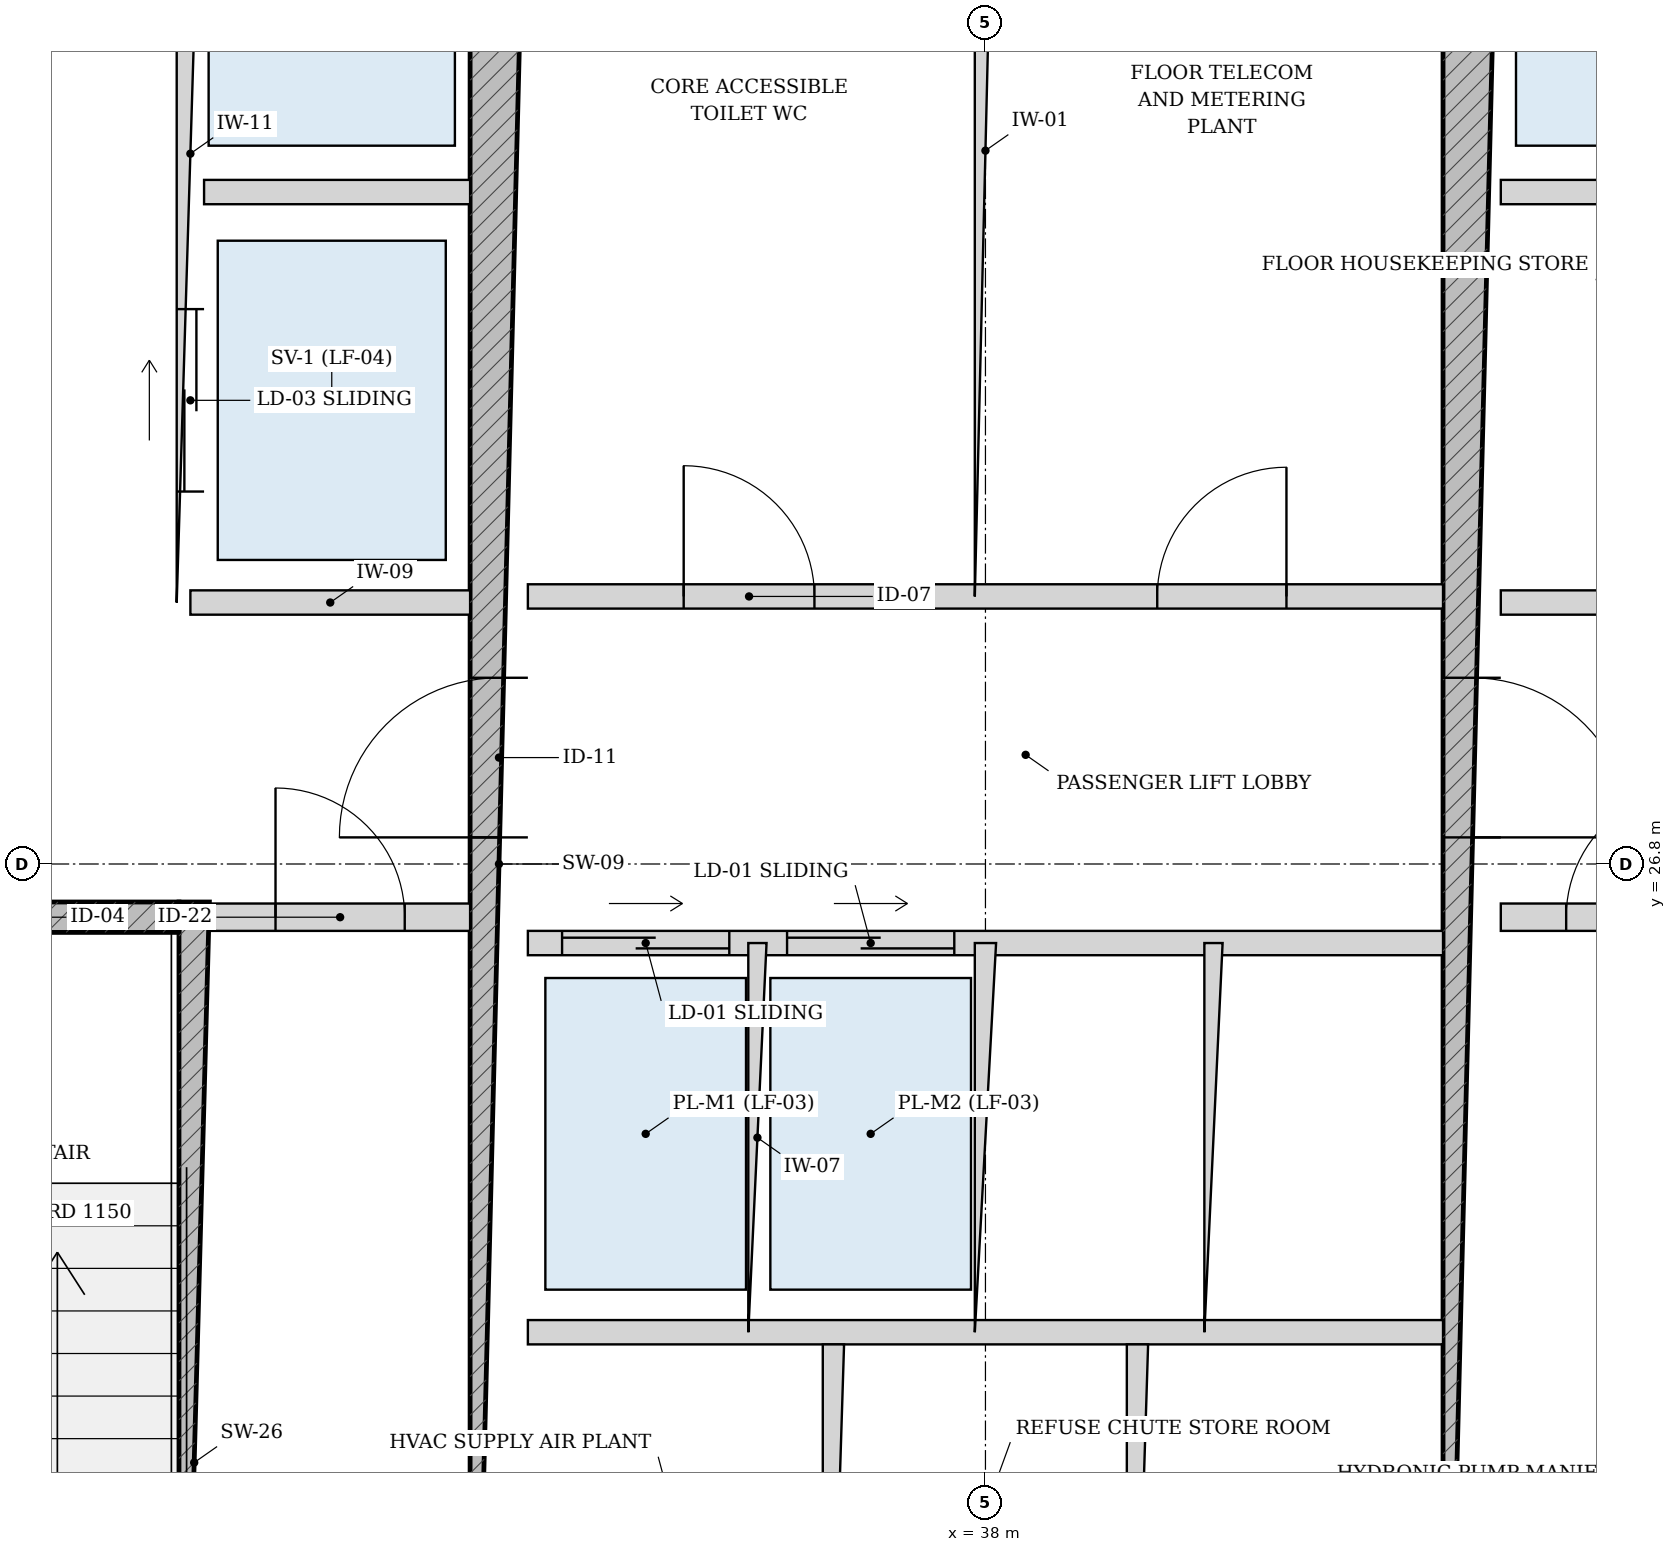
"""IFC4 building model, lengths in metres.
Left out: names, types, materials, properties, quantities, classifications, styles, units other than length and angle.
Written with IfcOpenShell. Run it as: python <this file> out.ifc"""

import sys

from ifc_helpers import new_model, si_unit, direction, frame, frame_2d, origin, place, context, subcontext, project, spatial, rectangle, extrude, source, transform, mapped, element, fill, save


model = new_model("IFC4")
c1 = context("Model", 3, precision=1e-05, world=origin(), true_north=direction((-0.2419218956, 0.970295726276)))
c2 = subcontext(c1, "Body", "Model", "MODEL_VIEW")
j1 = project(units=[si_unit("LENGTHUNIT", "METRE"), si_unit("PLANEANGLEUNIT", "RADIAN")], contexts=[c1])
p1 = place(None, origin())
s1 = spatial("IfcSite", under=j1, at=p1, CompositionType="ELEMENT")
p2 = place(p1, origin())
s2 = spatial("IfcBuilding", under=s1, at=p2, CompositionType="ELEMENT")
p3 = place(p2, frame((0.0, 0.0, 167.8)))
s3 = spatial("IfcBuildingStorey", under=s2, at=p3, CompositionType="ELEMENT", Elevation=167.8)
p4 = place(p3, frame((32.795, 19.175, 0.0), z_axis=(0.0, 0.0, 1.0), x_axis=(0.0, 1.0, 0.0)))
e1 = element("IfcWall", 1, at=p4, inside=s3, PredefinedType="SOLIDWALL", context=c2, shape_type="SweptSolid", body=[
    extrude(rectangle(XDim=7.375, YDim=0.2, at=frame_2d((3.688, 0.0))), origin(), (0.0, 0.0, 1.0), 3.33),
])
p5 = place(p3, frame((29.375, 26.45, 0.0), z_axis=(0.0, 0.0, 1.0), x_axis=(1.0, 0.0, 0.0)))
e2 = element("IfcWall", 2, at=p5, inside=s3, PredefinedType="SOLIDWALL", context=c2, shape_type="SweptSolid", body=[
    extrude(rectangle(XDim=3.32, YDim=0.2, at=frame_2d((1.66, 0.0))), origin(), (0.0, 0.0, 1.0), 3.33),
])
p6 = place(p5, frame((1.185, 0.0, 0.0)))
e3 = element("IfcOpeningElement", 3, at=p6, cuts=e2, PredefinedType="OPENING", context=c2, shape_type="SweptSolid", body=[
    extrude(rectangle(XDim=0.95, YDim=2.15, at=frame_2d((0.475, 1.075))), frame((0.0, 0.11, 0.0), z_axis=(0.0, -1.0, 0.0), x_axis=(1.0, 0.0, 0.0)), (0.0, 0.0, 1.0), 0.22),
])
p7 = place(p3, frame((34.8, 19.175, 0.0), z_axis=(0.0, 0.0, 1.0), x_axis=(0.0, 1.0, 0.0)))
e4 = element("IfcWall", 4, at=p7, inside=s3, PredefinedType="SHEAR", context=c2, shape_type="SweptSolid", body=[
    extrude(rectangle(XDim=15.25, YDim=0.38, at=frame_2d((7.625, 0.0))), origin(), (0.0, 0.0, 1.0), 3.33),
])
p8 = place(p7, frame((7.8, 0.0, 0.0)))
e5 = element("IfcOpeningElement", 5, at=p8, cuts=e4, PredefinedType="OPENING", context=c2, shape_type="SweptSolid", body=[
    extrude(rectangle(XDim=1.05, YDim=2.15, at=frame_2d((0.525, 1.075))), frame((0.0, 0.2, 0.0), z_axis=(0.0, -1.0, 0.0), x_axis=(1.0, 0.0, 0.0)), (0.0, 0.0, 1.0), 0.4),
])
p9 = place(p3, frame((41.2, 19.175, 0.0), z_axis=(0.0, 0.0, 1.0), x_axis=(0.0, 1.0, 0.0)))
e6 = element("IfcWall", 6, at=p9, inside=s3, PredefinedType="SHEAR", context=c2, shape_type="SweptSolid", body=[
    extrude(rectangle(XDim=15.25, YDim=0.38, at=frame_2d((7.625, 0.0))), origin(), (0.0, 0.0, 1.0), 3.33),
])
p10 = place(p9, frame((7.8, 0.0, 0.0)))
e7 = element("IfcOpeningElement", 7, at=p10, cuts=e6, PredefinedType="OPENING", context=c2, shape_type="SweptSolid", body=[
    extrude(rectangle(XDim=1.05, YDim=2.15, at=frame_2d((0.525, 1.075))), frame((0.0, 0.2, 0.0), z_axis=(0.0, -1.0, 0.0), x_axis=(1.0, 0.0, 0.0)), (0.0, 0.0, 1.0), 0.4),
])
p11 = place(p3, frame((32.9, 26.45, 0.0), z_axis=(0.0, 0.0, 1.0), x_axis=(1.0, 0.0, 0.0)))
e8 = element("IfcWall", 8, at=p11, inside=s3, PredefinedType="PARTITIONING", context=c2, shape_type="SweptSolid", body=[
    extrude(rectangle(XDim=1.71, YDim=0.18, at=frame_2d((0.855, 0.0))), origin(), (0.0, 0.0, 1.0), 3.33),
])
p12 = place(p11, frame((0.43, 0.0, 0.0)))
e9 = element("IfcOpeningElement", 9, at=p12, cuts=e8, PredefinedType="OPENING", context=c2, shape_type="SweptSolid", body=[
    extrude(rectangle(XDim=0.85, YDim=2.1, at=frame_2d((0.425, 1.05))), frame((0.0, 0.1, 0.0), z_axis=(0.0, -1.0, 0.0), x_axis=(1.0, 0.0, 0.0)), (0.0, 0.0, 1.0), 0.2),
])
p13 = place(p3, frame((41.39, 26.45, 0.0), z_axis=(0.0, 0.0, 1.0), x_axis=(1.0, 0.0, 0.0)))
e10 = element("IfcWall", 10, at=p13, inside=s3, PredefinedType="PARTITIONING", context=c2, shape_type="SweptSolid", body=[
    extrude(rectangle(XDim=1.71, YDim=0.18, at=frame_2d((0.855, 0.0))), origin(), (0.0, 0.0, 1.0), 3.33),
])
p14 = place(p13, frame((0.43, 0.0, 0.0)))
e11 = element("IfcOpeningElement", 11, at=p14, cuts=e10, PredefinedType="OPENING", context=c2, shape_type="SweptSolid", body=[
    extrude(rectangle(XDim=0.85, YDim=2.1, at=frame_2d((0.425, 1.05))), frame((0.0, 0.1, 0.0), z_axis=(0.0, -1.0, 0.0), x_axis=(1.0, 0.0, 0.0)), (0.0, 0.0, 1.0), 0.2),
])
p15 = place(p3, frame((32.77, 28.52, 0.0), z_axis=(0.0, 0.0, 1.0), x_axis=(0.0, 1.0, 0.0)))
e12 = element("IfcWall", 12, at=p15, inside=s3, PredefinedType="PARTITIONING", context=c2, shape_type="SweptSolid", body=[
    extrude(rectangle(XDim=5.905, YDim=0.18, at=frame_2d((2.953, 0.0))), origin(), (0.0, 0.0, 1.0), 3.33),
])
p16 = place(p15, frame((3.655, 0.0, 0.0)))
e13 = element("IfcOpeningElement", 13, at=p16, cuts=e12, PredefinedType="OPENING", context=c2, shape_type="SweptSolid", body=[
    extrude(rectangle(XDim=1.15, YDim=2.2, at=frame_2d((0.575, 1.1))), frame((0.0, 0.1, 0.0), z_axis=(0.0, -1.0, 0.0), x_axis=(1.0, 0.0, 0.0)), (0.0, 0.0, 1.0), 0.2),
])
p17 = place(p15, frame((0.73, 0.0, 0.0)))
e14 = element("IfcOpeningElement", 14, at=p17, cuts=e12, PredefinedType="OPENING", context=c2, shape_type="SweptSolid", body=[
    extrude(rectangle(XDim=1.2, YDim=2.25, at=frame_2d((0.6, 1.125))), frame((0.0, 0.1, 0.0), z_axis=(0.0, -1.0, 0.0), x_axis=(1.0, 0.0, 0.0)), (0.0, 0.0, 1.0), 0.2),
])
p18 = place(p3, frame((32.86, 31.22, 0.0), z_axis=(0.0, 0.0, 1.0), x_axis=(1.0, 0.0, 0.0)))
e15 = element("IfcWall", 15, at=p18, inside=s3, PredefinedType="PARTITIONING", context=c2, shape_type="SweptSolid", body=[
    extrude(rectangle(XDim=1.75, YDim=0.16, at=frame_2d((0.875, 0.0))), origin(), (0.0, 0.0, 1.0), 3.33),
])
p19 = place(p3, frame((32.77, 28.52, 0.0), z_axis=(0.0, 0.0, 1.0), x_axis=(1.0, 0.0, 0.0)))
e16 = element("IfcWall", 16, at=p19, inside=s3, PredefinedType="PARTITIONING", context=c2, shape_type="SweptSolid", body=[
    extrude(rectangle(XDim=1.84, YDim=0.16, at=frame_2d((0.92, 0.0))), origin(), (0.0, 0.0, 1.0), 3.33),
])
p20 = place(p3, frame((41.39, 31.22, 0.0), z_axis=(0.0, 0.0, 1.0), x_axis=(1.0, 0.0, 0.0)))
e17 = element("IfcWall", 17, at=p20, inside=s3, PredefinedType="PARTITIONING", context=c2, shape_type="SweptSolid", body=[
    extrude(rectangle(XDim=1.75, YDim=0.16, at=frame_2d((0.875, 0.0))), origin(), (0.0, 0.0, 1.0), 3.33),
])
p21 = place(p3, frame((41.39, 28.52, 0.0), z_axis=(0.0, 0.0, 1.0), x_axis=(1.0, 0.0, 0.0)))
e18 = element("IfcWall", 18, at=p21, inside=s3, PredefinedType="PARTITIONING", context=c2, shape_type="SweptSolid", body=[
    extrude(rectangle(XDim=1.84, YDim=0.16, at=frame_2d((0.92, 0.0))), origin(), (0.0, 0.0, 1.0), 3.33),
])
p22 = place(p3, frame((34.99, 28.56, 0.0), z_axis=(0.0, 0.0, 1.0), x_axis=(1.0, 0.0, 0.0)))
e19 = element("IfcWall", 19, at=p22, inside=s3, PredefinedType="PARTITIONING", context=c2, shape_type="SweptSolid", body=[
    extrude(rectangle(XDim=6.02, YDim=0.16, at=frame_2d((3.01, 0.0))), origin(), (0.0, 0.0, 1.0), 3.33),
])
p23 = place(p22, frame((1.025, 0.0, 0.0)))
e20 = element("IfcOpeningElement", 20, at=p23, cuts=e19, PredefinedType="OPENING", context=c2, shape_type="SweptSolid", body=[
    extrude(rectangle(XDim=0.86, YDim=2.1, at=frame_2d((0.43, 1.05))), frame((0.0, 0.09, 0.0), z_axis=(0.0, -1.0, 0.0), x_axis=(1.0, 0.0, 0.0)), (0.0, 0.0, 1.0), 0.18),
])
p24 = place(p22, frame((4.14, 0.0, 0.0)))
e21 = element("IfcOpeningElement", 21, at=p24, cuts=e19, PredefinedType="OPENING", context=c2, shape_type="SweptSolid", body=[
    extrude(rectangle(XDim=0.85, YDim=2.1, at=frame_2d((0.425, 1.05))), frame((0.0, 0.09, 0.0), z_axis=(0.0, -1.0, 0.0), x_axis=(1.0, 0.0, 0.0)), (0.0, 0.0, 1.0), 0.18),
])
p25 = place(p3, frame((38.0, 28.56, 0.0), z_axis=(0.0, 0.0, 1.0), x_axis=(0.0, 1.0, 0.0)))
e22 = element("IfcWall", 22, at=p25, inside=s3, PredefinedType="PARTITIONING", context=c2, shape_type="SweptSolid", body=[
    extrude(rectangle(XDim=5.865, YDim=0.14, at=frame_2d((2.933, 0.0))), origin(), (0.0, 0.0, 1.0), 3.33),
])
p26 = place(p3, frame((34.99, 26.28, 0.0), z_axis=(0.0, 0.0, 1.0), x_axis=(1.0, 0.0, 0.0)))
e23 = element("IfcWall", 23, at=p26, inside=s3, PredefinedType="PARTITIONING", context=c2, shape_type="SweptSolid", body=[
    extrude(rectangle(XDim=6.02, YDim=0.16, at=frame_2d((3.01, 0.0))), origin(), (0.0, 0.0, 1.0), 3.33),
])
p27 = place(p26, frame((0.225, 0.0, 0.0)))
e24 = element("IfcOpeningElement", 24, at=p27, cuts=e23, PredefinedType="OPENING", context=c2, shape_type="SweptSolid", body=[
    extrude(rectangle(XDim=1.1, YDim=2.2, at=frame_2d((0.55, 1.1))), frame((0.0, 0.09, 0.0), z_axis=(0.0, -1.0, 0.0), x_axis=(1.0, 0.0, 0.0)), (0.0, 0.0, 1.0), 0.18),
])
p28 = place(p26, frame((1.705, 0.0, 0.0)))
e25 = element("IfcOpeningElement", 25, at=p28, cuts=e23, PredefinedType="OPENING", context=c2, shape_type="SweptSolid", body=[
    extrude(rectangle(XDim=1.1, YDim=2.2, at=frame_2d((0.55, 1.1))), frame((0.0, 0.09, 0.0), z_axis=(0.0, -1.0, 0.0), x_axis=(1.0, 0.0, 0.0)), (0.0, 0.0, 1.0), 0.18),
])
p29 = place(p3, frame((34.99, 23.72, 0.0), z_axis=(0.0, 0.0, 1.0), x_axis=(1.0, 0.0, 0.0)))
e26 = element("IfcWall", 26, at=p29, inside=s3, PredefinedType="PARTITIONING", context=c2, shape_type="SweptSolid", body=[
    extrude(rectangle(XDim=6.02, YDim=0.16, at=frame_2d((3.01, 0.0))), origin(), (0.0, 0.0, 1.0), 3.33),
])
p30 = place(p3, frame((36.5, 23.72, 0.0), z_axis=(0.0, 0.0, 1.0), x_axis=(0.0, 1.0, 0.0)))
e27 = element("IfcWall", 27, at=p30, inside=s3, PredefinedType="PARTITIONING", context=c2, shape_type="SweptSolid", body=[
    extrude(rectangle(XDim=2.56, YDim=0.12, at=frame_2d((1.28, 0.0))), origin(), (0.0, 0.0, 1.0), 3.33),
])
p31 = place(p3, frame((38.0, 23.72, 0.0), z_axis=(0.0, 0.0, 1.0), x_axis=(0.0, 1.0, 0.0)))
e28 = element("IfcWall", 28, at=p31, inside=s3, PredefinedType="PARTITIONING", context=c2, shape_type="SweptSolid", body=[
    extrude(rectangle(XDim=2.56, YDim=0.14, at=frame_2d((1.28, 0.0))), origin(), (0.0, 0.0, 1.0), 3.33),
])
p32 = place(p3, frame((39.5, 23.72, 0.0), z_axis=(0.0, 0.0, 1.0), x_axis=(0.0, 1.0, 0.0)))
e29 = element("IfcWall", 29, at=p32, inside=s3, PredefinedType="PARTITIONING", context=c2, shape_type="SweptSolid", body=[
    extrude(rectangle(XDim=2.56, YDim=0.12, at=frame_2d((1.28, 0.0))), origin(), (0.0, 0.0, 1.0), 3.33),
])
p33 = place(p3, frame((37.0, 19.175, 0.0), z_axis=(0.0, 0.0, 1.0), x_axis=(0.0, 1.0, 0.0)))
e30 = element("IfcWall", 30, at=p33, inside=s3, PredefinedType="PARTITIONING", context=c2, shape_type="SweptSolid", body=[
    extrude(rectangle(XDim=4.465, YDim=0.14, at=frame_2d((2.232, 0.0))), origin(), (0.0, 0.0, 1.0), 3.33),
])
p34 = place(p33, frame((1.808, 0.0, 0.0)))
e31 = element("IfcOpeningElement", 31, at=p34, cuts=e30, PredefinedType="OPENING", context=c2, shape_type="SweptSolid", body=[
    extrude(rectangle(XDim=0.85, YDim=2.1, at=frame_2d((0.425, 1.05))), frame((0.0, 0.08, 0.0), z_axis=(0.0, -1.0, 0.0), x_axis=(1.0, 0.0, 0.0)), (0.0, 0.0, 1.0), 0.16),
])
p35 = place(p3, frame((39.0, 19.175, 0.0), z_axis=(0.0, 0.0, 1.0), x_axis=(0.0, 1.0, 0.0)))
e32 = element("IfcWall", 32, at=p35, inside=s3, PredefinedType="PARTITIONING", context=c2, shape_type="SweptSolid", body=[
    extrude(rectangle(XDim=4.465, YDim=0.14, at=frame_2d((2.232, 0.0))), origin(), (0.0, 0.0, 1.0), 3.33),
])
p36 = place(p35, frame((1.808, 0.0, 0.0)))
e33 = element("IfcOpeningElement", 33, at=p36, cuts=e32, PredefinedType="OPENING", context=c2, shape_type="SweptSolid", body=[
    extrude(rectangle(XDim=0.85, YDim=2.1, at=frame_2d((0.425, 1.05))), frame((0.0, 0.08, 0.0), z_axis=(0.0, -1.0, 0.0), x_axis=(1.0, 0.0, 0.0)), (0.0, 0.0, 1.0), 0.16),
])
m1 = source(origin(), c2, "Body", "SweptSolid", [
    extrude(rectangle(XDim=1.05, YDim=2.15, at=frame_2d((0.525, 1.075))), frame((0.0, 0.025, 0.0), z_axis=(0.0, -1.0, 0.0), x_axis=(1.0, 0.0, 0.0)), (0.0, 0.0, 1.0), 0.05),
])
p37 = place(p8, origin())
e34 = element("IfcDoor", 34, at=p37, inside=s3, OperationType="SINGLE_SWING_LEFT", PredefinedType="DOOR", context=c2, shape_type="MappedRepresentation", body=[
    mapped(m1, transform((0.0, 0.0, 0.0), scale=1.0)),
])
fill(e5, e34)
p38 = place(p10, frame((1.05, 0.0, 0.0), z_axis=(0.0, 0.0, 1.0), x_axis=(-1.0, 0.0, 0.0)))
e35 = element("IfcDoor", 35, at=p38, inside=s3, OperationType="SINGLE_SWING_RIGHT", PredefinedType="DOOR", context=c2, shape_type="MappedRepresentation", body=[
    mapped(m1, transform((0.0, 0.0, 0.0), scale=1.0)),
])
fill(e7, e35)
m2 = source(origin(), c2, "Body", "SweptSolid", [
    extrude(rectangle(XDim=0.85, YDim=2.1, at=frame_2d((0.425, 1.05))), frame((0.0, 0.025, 0.0), z_axis=(0.0, -1.0, 0.0), x_axis=(1.0, 0.0, 0.0)), (0.0, 0.0, 1.0), 0.05),
])
p39 = place(p12, origin())
e36 = element("IfcDoor", 36, at=p39, inside=s3, OperationType="SINGLE_SWING_LEFT", PredefinedType="DOOR", context=c2, shape_type="MappedRepresentation", body=[
    mapped(m2, transform((0.0, 0.0, 0.0), scale=1.0)),
])
fill(e9, e36)
p40 = place(p14, origin())
e37 = element("IfcDoor", 37, at=p40, inside=s3, OperationType="SINGLE_SWING_RIGHT", PredefinedType="DOOR", context=c2, shape_type="MappedRepresentation", body=[
    mapped(m2, transform((0.0, 0.0, 0.0), scale=1.0)),
])
fill(e11, e37)
m3 = source(origin(), c2, "Body", "SweptSolid", [
    extrude(rectangle(XDim=0.86, YDim=2.1, at=frame_2d((0.43, 1.05))), frame((0.0, 0.025, 0.0), z_axis=(0.0, -1.0, 0.0), x_axis=(1.0, 0.0, 0.0)), (0.0, 0.0, 1.0), 0.05),
])
p41 = place(p23, origin())
e38 = element("IfcDoor", 38, at=p41, inside=s3, OperationType="SINGLE_SWING_LEFT", PredefinedType="DOOR", context=c2, shape_type="MappedRepresentation", body=[
    mapped(m3, transform((0.0, 0.0, 0.0), scale=1.0)),
])
fill(e20, e38)
p42 = place(p24, origin())
e39 = element("IfcDoor", 39, at=p42, inside=s3, OperationType="SINGLE_SWING_RIGHT", PredefinedType="DOOR", context=c2, shape_type="MappedRepresentation", body=[
    mapped(m2, transform((0.0, 0.0, 0.0), scale=1.0)),
])
fill(e21, e39)
m4 = source(origin(), c2, "Body", "SweptSolid", [
    extrude(rectangle(XDim=1.2, YDim=2.25, at=frame_2d((0.6, 1.125))), frame((0.0, 0.025, 0.0), z_axis=(0.0, -1.0, 0.0), x_axis=(1.0, 0.0, 0.0)), (0.0, 0.0, 1.0), 0.05),
])
p43 = place(p17, origin())
e40 = element("IfcDoor", 40, at=p43, inside=s3, OperationType="DOUBLE_DOOR_SLIDING", PredefinedType="DOOR", context=c2, shape_type="MappedRepresentation", body=[
    mapped(m4, transform((0.0, 0.0, 0.0), scale=1.0)),
])
fill(e14, e40)
m5 = source(origin(), c2, "Body", "SweptSolid", [
    extrude(rectangle(XDim=1.1, YDim=2.2, at=frame_2d((0.55, 1.1))), frame((0.0, 0.025, 0.0), z_axis=(0.0, -1.0, 0.0), x_axis=(1.0, 0.0, 0.0)), (0.0, 0.0, 1.0), 0.05),
])
p44 = place(p27, origin())
e41 = element("IfcDoor", 41, at=p44, inside=s3, OperationType="DOUBLE_DOOR_SLIDING", PredefinedType="DOOR", context=c2, shape_type="MappedRepresentation", body=[
    mapped(m5, transform((0.0, 0.0, 0.0), scale=1.0)),
])
fill(e24, e41)
p45 = place(p28, origin())
e42 = element("IfcDoor", 42, at=p45, inside=s3, OperationType="DOUBLE_DOOR_SLIDING", PredefinedType="DOOR", context=c2, shape_type="MappedRepresentation", body=[
    mapped(m5, transform((0.0, 0.0, 0.0), scale=1.0)),
])
fill(e25, e42)
save(model, sys.argv[1])
